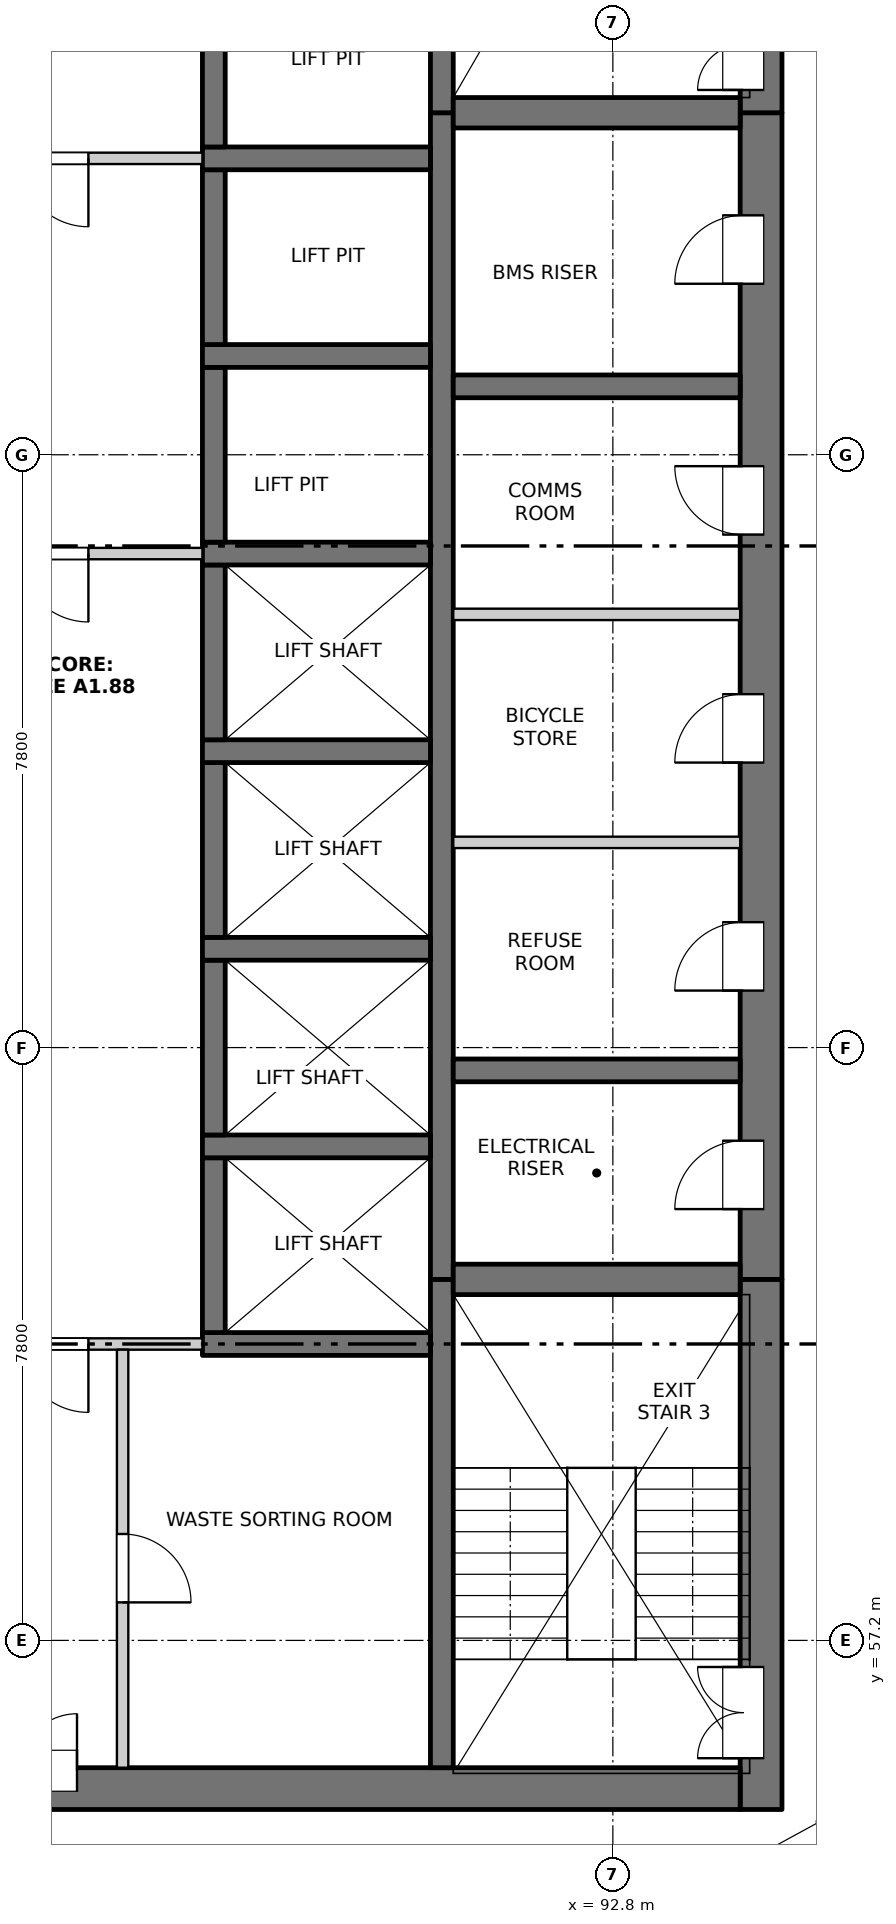
"""IFC4 building model, lengths in metres.
Left out: names, types, materials, properties, quantities, classifications, styles, units other than length and angle.
Written with IfcOpenShell. Run it as: python <this file> out.ifc"""

import sys

from ifc_helpers import new_model, si_unit, direction, frame, frame_2d, origin, place, context, subcontext, project, spatial, rectangle, extrude, element, fill, save


model = new_model("IFC4")
c1 = context("Model", 3, precision=1e-05, world=origin(), true_north=direction((0.0, 1.0)))
c2 = subcontext(c1, "Body", "Model", "MODEL_VIEW")
j1 = project(units=[si_unit("LENGTHUNIT", "METRE"), si_unit("PLANEANGLEUNIT", "RADIAN")], contexts=[c1])
p1 = place(None, origin())
s1 = spatial("IfcSite", under=j1, at=p1, CompositionType="ELEMENT")
p2 = place(p1, origin())
s2 = spatial("IfcBuilding", under=s1, at=p2, CompositionType="ELEMENT")
p3 = place(p2, frame((0.0, 0.0, 130.5)))
s3 = spatial("IfcBuildingStorey", under=s2, at=p3, CompositionType="ELEMENT", Elevation=130.5)
p4 = place(p3, frame((94.75, 54.975, -0.25), z_axis=(0.0, 0.0, 1.0), x_axis=(0.0, 1.0, 0.0)))
e1 = element("IfcWall", 1, at=p4, inside=s3, PredefinedType="SOLIDWALL", context=c2, shape_type="SweptSolid", body=[
    extrude(rectangle(XDim=6.975, YDim=0.55, at=frame_2d((3.487, 0.0))), origin(), (0.0, 0.0, 1.0), 3.4),
])
p5 = place(p4, frame((0.675, 0.0, 0.25)))
e2 = element("IfcOpeningElement", 2, at=p5, cuts=e1, PredefinedType="OPENING", context=c2, shape_type="SweptSolid", body=[
    extrude(rectangle(XDim=1.2, YDim=2.1, at=frame_2d((0.6, 1.05))), frame((0.0, 0.285, 0.0), z_axis=(0.0, -1.0, 0.0), x_axis=(1.0, 0.0, 0.0)), (0.0, 0.0, 1.0), 0.57),
])
p6 = place(p3, frame((94.75, 61.95, -0.25), z_axis=(0.0, 0.0, 1.0), x_axis=(0.0, 1.0, 0.0)))
e3 = element("IfcWall", 3, at=p6, inside=s3, PredefinedType="SOLIDWALL", context=c2, shape_type="SweptSolid", body=[
    extrude(rectangle(XDim=15.35, YDim=0.55, at=frame_2d((7.675, 0.0))), origin(), (0.0, 0.0, 1.0), 3.4),
])
p7 = place(p6, frame((0.925, 0.0, 0.25)))
e4 = element("IfcOpeningElement", 4, at=p7, cuts=e3, PredefinedType="OPENING", context=c2, shape_type="SweptSolid", body=[
    extrude(rectangle(XDim=0.9, YDim=2.1, at=frame_2d((0.45, 1.05))), frame((0.0, 0.285, 0.0), z_axis=(0.0, -1.0, 0.0), x_axis=(1.0, 0.0, 0.0)), (0.0, 0.0, 1.0), 0.57),
])
p8 = place(p6, frame((3.8, 0.0, 0.25)))
e5 = element("IfcOpeningElement", 5, at=p8, cuts=e3, PredefinedType="OPENING", context=c2, shape_type="SweptSolid", body=[
    extrude(rectangle(XDim=0.9, YDim=2.1, at=frame_2d((0.45, 1.05))), frame((0.0, 0.285, 0.0), z_axis=(0.0, -1.0, 0.0), x_axis=(1.0, 0.0, 0.0)), (0.0, 0.0, 1.0), 0.57),
])
p9 = place(p6, frame((6.8, 0.0, 0.25)))
e6 = element("IfcOpeningElement", 6, at=p9, cuts=e3, PredefinedType="OPENING", context=c2, shape_type="SweptSolid", body=[
    extrude(rectangle(XDim=0.9, YDim=2.1, at=frame_2d((0.45, 1.05))), frame((0.0, 0.285, 0.0), z_axis=(0.0, -1.0, 0.0), x_axis=(1.0, 0.0, 0.0)), (0.0, 0.0, 1.0), 0.57),
])
p10 = place(p6, frame((9.8, 0.0, 0.25)))
e7 = element("IfcOpeningElement", 7, at=p10, cuts=e3, PredefinedType="OPENING", context=c2, shape_type="SweptSolid", body=[
    extrude(rectangle(XDim=0.9, YDim=2.1, at=frame_2d((0.45, 1.05))), frame((0.0, 0.285, 0.0), z_axis=(0.0, -1.0, 0.0), x_axis=(1.0, 0.0, 0.0)), (0.0, 0.0, 1.0), 0.57),
])
p11 = place(p6, frame((13.1, 0.0, 0.25)))
e8 = element("IfcOpeningElement", 8, at=p11, cuts=e3, PredefinedType="OPENING", context=c2, shape_type="SweptSolid", body=[
    extrude(rectangle(XDim=0.9, YDim=2.1, at=frame_2d((0.45, 1.05))), frame((0.0, 0.285, 0.0), z_axis=(0.0, -1.0, 0.0), x_axis=(1.0, 0.0, 0.0)), (0.0, 0.0, 1.0), 0.57),
])
p12 = place(p3, frame((94.75, 77.3, -0.25), z_axis=(0.0, 0.0, 1.0), x_axis=(0.0, 1.0, 0.0)))
e9 = element("IfcWall", 9, at=p12, inside=s3, PredefinedType="SOLIDWALL", context=c2, shape_type="SweptSolid", body=[
    extrude(rectangle(XDim=7.475, YDim=0.55, at=frame_2d((3.737, 0.0))), origin(), (0.0, 0.0, 1.0), 3.4),
])
p13 = place(p12, frame((0.3, 0.0, 0.25)))
e10 = element("IfcOpeningElement", 10, at=p13, cuts=e9, PredefinedType="OPENING", context=c2, shape_type="SweptSolid", body=[
    extrude(rectangle(XDim=1.2, YDim=2.1, at=frame_2d((0.6, 1.05))), frame((0.0, 0.285, 0.0), z_axis=(0.0, -1.0, 0.0), x_axis=(1.0, 0.0, 0.0)), (0.0, 0.0, 1.0), 0.57),
])
p14 = place(p3, frame((75.525, 55.25, -0.25), z_axis=(0.0, 0.0, 1.0), x_axis=(1.0, 0.0, 0.0)))
e11 = element("IfcWall", 11, at=p14, inside=s3, PredefinedType="SOLIDWALL", context=c2, shape_type="SweptSolid", body=[
    extrude(rectangle(XDim=18.95, YDim=0.55, at=frame_2d((9.475, 0.0))), origin(), (0.0, 0.0, 1.0), 3.4),
])
p15 = place(p14, frame((8.725, 0.0, 0.25)))
e12 = element("IfcOpeningElement", 12, at=p15, cuts=e11, PredefinedType="OPENING", context=c2, shape_type="SweptSolid", body=[
    extrude(rectangle(XDim=1.5, YDim=2.1, at=frame_2d((0.75, 1.05))), frame((0.0, 0.285, 0.0), z_axis=(0.0, -1.0, 0.0), x_axis=(1.0, 0.0, 0.0)), (0.0, 0.0, 1.0), 0.57),
])
p16 = place(p3, frame((90.55, 55.525, -0.25), z_axis=(0.0, 0.0, 1.0), x_axis=(0.0, 1.0, 0.0)))
e13 = element("IfcWall", 13, at=p16, inside=s3, PredefinedType="SOLIDWALL", context=c2, shape_type="SweptSolid", body=[
    extrude(rectangle(XDim=6.425, YDim=0.3, at=frame_2d((3.212, 0.0))), origin(), (0.0, 0.0, 1.0), 3.4),
])
p17 = place(p3, frame((90.55, 61.95, -0.25), z_axis=(0.0, 0.0, 1.0), x_axis=(0.0, 1.0, 0.0)))
e14 = element("IfcWall", 14, at=p17, inside=s3, PredefinedType="SOLIDWALL", context=c2, shape_type="SweptSolid", body=[
    extrude(rectangle(XDim=15.35, YDim=0.3, at=frame_2d((7.675, 0.0))), origin(), (0.0, 0.0, 1.0), 3.4),
])
p18 = place(p3, frame((90.55, 77.3, -0.25), z_axis=(0.0, 0.0, 1.0), x_axis=(0.0, 1.0, 0.0)))
e15 = element("IfcWall", 15, at=p18, inside=s3, PredefinedType="SOLIDWALL", context=c2, shape_type="SweptSolid", body=[
    extrude(rectangle(XDim=6.925, YDim=0.3, at=frame_2d((3.462, 0.0))), origin(), (0.0, 0.0, 1.0), 3.4),
])
p19 = place(p3, frame((87.4, 61.1, -0.25), z_axis=(0.0, 0.0, 1.0), x_axis=(1.0, 0.0, 0.0)))
e16 = element("IfcWall", 16, at=p19, inside=s3, PredefinedType="SOLIDWALL", context=c2, shape_type="SweptSolid", body=[
    extrude(rectangle(XDim=3.0, YDim=0.3, at=frame_2d((1.5, 0.0))), origin(), (0.0, 0.0, 1.0), 3.4),
])
p20 = place(p3, frame((87.55, 61.25, -0.25), z_axis=(0.0, 0.0, 1.0), x_axis=(0.0, 1.0, 0.0)))
e17 = element("IfcWall", 17, at=p20, inside=s3, PredefinedType="SOLIDWALL", context=c2, shape_type="SweptSolid", body=[
    extrude(rectangle(XDim=2.3, YDim=0.3, at=frame_2d((1.15, 0.0))), origin(), (0.0, 0.0, 1.0), 3.4),
])
p21 = place(p3, frame((87.4, 63.7, -0.25), z_axis=(0.0, 0.0, 1.0), x_axis=(1.0, 0.0, 0.0)))
e18 = element("IfcWall", 18, at=p21, inside=s3, PredefinedType="SOLIDWALL", context=c2, shape_type="SweptSolid", body=[
    extrude(rectangle(XDim=3.0, YDim=0.3, at=frame_2d((1.5, 0.0))), origin(), (0.0, 0.0, 1.0), 3.4),
])
p22 = place(p3, frame((87.55, 63.85, -0.25), z_axis=(0.0, 0.0, 1.0), x_axis=(0.0, 1.0, 0.0)))
e19 = element("IfcWall", 19, at=p22, inside=s3, PredefinedType="SOLIDWALL", context=c2, shape_type="SweptSolid", body=[
    extrude(rectangle(XDim=2.3, YDim=0.3, at=frame_2d((1.15, 0.0))), origin(), (0.0, 0.0, 1.0), 3.4),
])
p23 = place(p3, frame((87.4, 66.3, -0.25), z_axis=(0.0, 0.0, 1.0), x_axis=(1.0, 0.0, 0.0)))
e20 = element("IfcWall", 20, at=p23, inside=s3, PredefinedType="SOLIDWALL", context=c2, shape_type="SweptSolid", body=[
    extrude(rectangle(XDim=3.0, YDim=0.3, at=frame_2d((1.5, 0.0))), origin(), (0.0, 0.0, 1.0), 3.4),
])
p24 = place(p3, frame((87.55, 66.45, -0.25), z_axis=(0.0, 0.0, 1.0), x_axis=(0.0, 1.0, 0.0)))
e21 = element("IfcWall", 21, at=p24, inside=s3, PredefinedType="SOLIDWALL", context=c2, shape_type="SweptSolid", body=[
    extrude(rectangle(XDim=2.3, YDim=0.3, at=frame_2d((1.15, 0.0))), origin(), (0.0, 0.0, 1.0), 3.4),
])
p25 = place(p3, frame((87.4, 68.9, -0.25), z_axis=(0.0, 0.0, 1.0), x_axis=(1.0, 0.0, 0.0)))
e22 = element("IfcWall", 22, at=p25, inside=s3, PredefinedType="SOLIDWALL", context=c2, shape_type="SweptSolid", body=[
    extrude(rectangle(XDim=3.0, YDim=0.3, at=frame_2d((1.5, 0.0))), origin(), (0.0, 0.0, 1.0), 3.4),
])
p26 = place(p3, frame((87.55, 69.05, -0.25), z_axis=(0.0, 0.0, 1.0), x_axis=(0.0, 1.0, 0.0)))
e23 = element("IfcWall", 23, at=p26, inside=s3, PredefinedType="SOLIDWALL", context=c2, shape_type="SweptSolid", body=[
    extrude(rectangle(XDim=2.3, YDim=0.3, at=frame_2d((1.15, 0.0))), origin(), (0.0, 0.0, 1.0), 3.4),
])
p27 = place(p3, frame((87.4, 71.5, -0.25), z_axis=(0.0, 0.0, 1.0), x_axis=(1.0, 0.0, 0.0)))
e24 = element("IfcWall", 24, at=p27, inside=s3, PredefinedType="SOLIDWALL", context=c2, shape_type="SweptSolid", body=[
    extrude(rectangle(XDim=3.0, YDim=0.3, at=frame_2d((1.5, 0.0))), origin(), (0.0, 0.0, 1.0), 3.4),
])
p28 = place(p3, frame((87.55, 71.65, -0.25), z_axis=(0.0, 0.0, 1.0), x_axis=(0.0, 1.0, 0.0)))
e25 = element("IfcWall", 25, at=p28, inside=s3, PredefinedType="SOLIDWALL", context=c2, shape_type="SweptSolid", body=[
    extrude(rectangle(XDim=2.3, YDim=0.3, at=frame_2d((1.15, 0.0))), origin(), (0.0, 0.0, 1.0), 3.4),
])
p29 = place(p3, frame((87.4, 74.1, -0.25), z_axis=(0.0, 0.0, 1.0), x_axis=(1.0, 0.0, 0.0)))
e26 = element("IfcWall", 26, at=p29, inside=s3, PredefinedType="SOLIDWALL", context=c2, shape_type="SweptSolid", body=[
    extrude(rectangle(XDim=3.0, YDim=0.3, at=frame_2d((1.5, 0.0))), origin(), (0.0, 0.0, 1.0), 3.4),
])
p30 = place(p3, frame((87.55, 74.25, -0.25), z_axis=(0.0, 0.0, 1.0), x_axis=(0.0, 1.0, 0.0)))
e27 = element("IfcWall", 27, at=p30, inside=s3, PredefinedType="SOLIDWALL", context=c2, shape_type="SweptSolid", body=[
    extrude(rectangle(XDim=2.3, YDim=0.3, at=frame_2d((1.15, 0.0))), origin(), (0.0, 0.0, 1.0), 3.4),
])
p31 = place(p3, frame((87.4, 76.7, -0.25), z_axis=(0.0, 0.0, 1.0), x_axis=(1.0, 0.0, 0.0)))
e28 = element("IfcWall", 28, at=p31, inside=s3, PredefinedType="SOLIDWALL", context=c2, shape_type="SweptSolid", body=[
    extrude(rectangle(XDim=3.0, YDim=0.3, at=frame_2d((1.5, 0.0))), origin(), (0.0, 0.0, 1.0), 3.4),
])
p32 = place(p3, frame((87.55, 76.85, -0.25), z_axis=(0.0, 0.0, 1.0), x_axis=(0.0, 1.0, 0.0)))
e29 = element("IfcWall", 29, at=p32, inside=s3, PredefinedType="SOLIDWALL", context=c2, shape_type="SweptSolid", body=[
    extrude(rectangle(XDim=2.3, YDim=0.3, at=frame_2d((1.15, 0.0))), origin(), (0.0, 0.0, 1.0), 3.4),
])
p33 = place(p3, frame((90.7, 61.95, -0.25), z_axis=(0.0, 0.0, 1.0), x_axis=(1.0, 0.0, 0.0)))
e30 = element("IfcWall", 30, at=p33, inside=s3, PredefinedType="SOLIDWALL", context=c2, shape_type="SweptSolid", body=[
    extrude(rectangle(XDim=3.775, YDim=0.4, at=frame_2d((1.888, 0.0))), origin(), (0.0, 0.0, 1.0), 3.4),
])
for number, where, z_axis, x_axis in (
    (31, (90.7, 64.7, -0.25), (0.0, 0.0, 1.0), (1.0, 0.0, 0.0)),
    (32, (90.7, 73.7, -0.25), (0.0, 0.0, 1.0), (1.0, 0.0, 0.0)),
):
    element("IfcWall", number, at=place(p3, frame(where, z_axis=z_axis, x_axis=x_axis)), inside=s3, PredefinedType="SOLIDWALL", context=c2, shape_type="SweptSolid", body=[
        extrude(rectangle(XDim=3.775, YDim=0.3, at=frame_2d((1.888, 0.0))), origin(), (0.0, 0.0, 1.0), 3.4),
    ])
p34 = place(p3, frame((90.7, 77.3, -0.25), z_axis=(0.0, 0.0, 1.0), x_axis=(1.0, 0.0, 0.0)))
e33 = element("IfcWall", 33, at=p34, inside=s3, PredefinedType="SOLIDWALL", context=c2, shape_type="SweptSolid", body=[
    extrude(rectangle(XDim=3.775, YDim=0.4, at=frame_2d((1.888, 0.0))), origin(), (0.0, 0.0, 1.0), 3.4),
])
p35 = place(p3, frame((82.6, 61.1, 0.0), z_axis=(0.0, 0.0, 1.0), x_axis=(1.0, 0.0, 0.0)))
e34 = element("IfcWall", 34, at=p35, inside=s3, PredefinedType="PARTITIONING", context=c2, shape_type="SweptSolid", body=[
    extrude(rectangle(XDim=4.8, YDim=0.15, at=frame_2d((2.4, 0.0))), origin(), (0.0, 0.0, 1.0), 3.15),
])
p36 = place(p35, frame((1.5, 0.0, 0.0)))
e35 = element("IfcOpeningElement", 35, at=p36, cuts=e34, PredefinedType="OPENING", context=c2, shape_type="SweptSolid", body=[
    extrude(rectangle(XDim=1.8, YDim=2.1, at=frame_2d((0.9, 1.05))), frame((0.0, 0.085, 0.0), z_axis=(0.0, -1.0, 0.0), x_axis=(1.0, 0.0, 0.0)), (0.0, 0.0, 1.0), 0.17),
])
for number, where, z_axis, x_axis in (
    (36, (90.7, 67.7, 0.0), (0.0, 0.0, 1.0), (1.0, 0.0, 0.0)),
    (37, (90.7, 70.7, 0.0), (0.0, 0.0, 1.0), (1.0, 0.0, 0.0)),
):
    element("IfcWall", number, at=place(p3, frame(where, z_axis=z_axis, x_axis=x_axis)), inside=s3, PredefinedType="PARTITIONING", context=c2, shape_type="SweptSolid", body=[
        extrude(rectangle(XDim=3.775, YDim=0.15, at=frame_2d((1.887, 0.0))), origin(), (0.0, 0.0, 1.0), 3.15),
    ])
p37 = place(p3, frame((82.6, 71.5, 0.0), z_axis=(0.0, 0.0, 1.0), x_axis=(1.0, 0.0, 0.0)))
e38 = element("IfcWall", 38, at=p37, inside=s3, PredefinedType="PARTITIONING", context=c2, shape_type="SweptSolid", body=[
    extrude(rectangle(XDim=4.8, YDim=0.15, at=frame_2d((2.4, 0.0))), origin(), (0.0, 0.0, 1.0), 3.15),
])
p38 = place(p37, frame((1.5, 0.0, 0.0)))
e39 = element("IfcOpeningElement", 39, at=p38, cuts=e38, PredefinedType="OPENING", context=c2, shape_type="SweptSolid", body=[
    extrude(rectangle(XDim=1.8, YDim=2.1, at=frame_2d((0.9, 1.05))), frame((0.0, 0.085, 0.0), z_axis=(0.0, -1.0, 0.0), x_axis=(1.0, 0.0, 0.0)), (0.0, 0.0, 1.0), 0.17),
])
p39 = place(p3, frame((82.6, 76.7, 0.0), z_axis=(0.0, 0.0, 1.0), x_axis=(1.0, 0.0, 0.0)))
e40 = element("IfcWall", 40, at=p39, inside=s3, PredefinedType="PARTITIONING", context=c2, shape_type="SweptSolid", body=[
    extrude(rectangle(XDim=4.8, YDim=0.15, at=frame_2d((2.4, 0.0))), origin(), (0.0, 0.0, 1.0), 3.15),
])
p40 = place(p39, frame((1.5, 0.0, 0.0)))
e41 = element("IfcOpeningElement", 41, at=p40, cuts=e40, PredefinedType="OPENING", context=c2, shape_type="SweptSolid", body=[
    extrude(rectangle(XDim=1.8, YDim=2.1, at=frame_2d((0.9, 1.05))), frame((0.0, 0.085, 0.0), z_axis=(0.0, -1.0, 0.0), x_axis=(1.0, 0.0, 0.0)), (0.0, 0.0, 1.0), 0.17),
])
p41 = place(p3, frame((86.35, 55.525, 0.0), z_axis=(0.0, 0.0, 1.0), x_axis=(0.0, 1.0, 0.0)))
e42 = element("IfcWall", 42, at=p41, inside=s3, PredefinedType="PARTITIONING", context=c2, shape_type="SweptSolid", body=[
    extrude(rectangle(XDim=5.5, YDim=0.15, at=frame_2d((2.75, 0.0))), origin(), (0.0, 0.0, 1.0), 3.15),
])
p42 = place(p41, frame((2.175, 0.0, 0.0)))
e43 = element("IfcOpeningElement", 43, at=p42, cuts=e42, PredefinedType="OPENING", context=c2, shape_type="SweptSolid", body=[
    extrude(rectangle(XDim=0.9, YDim=2.1, at=frame_2d((0.45, 1.05))), frame((0.0, 0.085, 0.0), z_axis=(0.0, -1.0, 0.0), x_axis=(1.0, 0.0, 0.0)), (0.0, 0.0, 1.0), 0.17),
])
p43 = place(p15, origin())
e44 = element("IfcDoor", 44, at=p43, inside=s3, OperationType="DOUBLE_DOOR_SINGLE_SWING", PredefinedType="DOOR", context=c2, shape_type="SweptSolid", body=[
    extrude(rectangle(XDim=1.5, YDim=2.1, at=frame_2d((0.75, 1.05))), frame((0.0, 0.26, 0.0), z_axis=(0.0, -1.0, 0.0), x_axis=(1.0, 0.0, 0.0)), (0.0, 0.0, 1.0), 0.05),
])
fill(e12, e44)
p44 = place(p5, origin())
e45 = element("IfcDoor", 45, at=p44, inside=s3, OperationType="DOUBLE_DOOR_SINGLE_SWING", PredefinedType="DOOR", context=c2, shape_type="SweptSolid", body=[
    extrude(rectangle(XDim=1.2, YDim=2.1, at=frame_2d((0.6, 1.05))), frame((0.0, 0.26, 0.0), z_axis=(0.0, -1.0, 0.0), x_axis=(1.0, 0.0, 0.0)), (0.0, 0.0, 1.0), 0.05),
])
fill(e2, e45)
p45 = place(p42, origin())
e46 = element("IfcDoor", 46, at=p45, inside=s3, OperationType="SINGLE_SWING_RIGHT", PredefinedType="DOOR", context=c2, shape_type="SweptSolid", body=[
    extrude(rectangle(XDim=0.9, YDim=2.1, at=frame_2d((0.45, 1.05))), frame((0.0, 0.025, 0.0), z_axis=(0.0, -1.0, 0.0), x_axis=(1.0, 0.0, 0.0)), (0.0, 0.0, 1.0), 0.05),
])
fill(e43, e46)
p46 = place(p36, origin())
e47 = element("IfcDoor", 47, at=p46, inside=s3, OperationType="DOUBLE_DOOR_SINGLE_SWING", PredefinedType="DOOR", context=c2, shape_type="SweptSolid", body=[
    extrude(rectangle(XDim=1.8, YDim=2.1, at=frame_2d((0.9, 1.05))), frame((0.0, 0.025, 0.0), z_axis=(0.0, -1.0, 0.0), x_axis=(1.0, 0.0, 0.0)), (0.0, 0.0, 1.0), 0.05),
])
fill(e35, e47)
p47 = place(p7, origin())
e48 = element("IfcDoor", 48, at=p47, inside=s3, OperationType="SINGLE_SWING_LEFT", PredefinedType="DOOR", context=c2, shape_type="SweptSolid", body=[
    extrude(rectangle(XDim=0.9, YDim=2.1, at=frame_2d((0.45, 1.05))), frame((0.0, 0.26, 0.0), z_axis=(0.0, -1.0, 0.0), x_axis=(1.0, 0.0, 0.0)), (0.0, 0.0, 1.0), 0.05),
])
fill(e4, e48)
p48 = place(p8, origin())
e49 = element("IfcDoor", 49, at=p48, inside=s3, OperationType="SINGLE_SWING_LEFT", PredefinedType="DOOR", context=c2, shape_type="SweptSolid", body=[
    extrude(rectangle(XDim=0.9, YDim=2.1, at=frame_2d((0.45, 1.05))), frame((0.0, 0.26, 0.0), z_axis=(0.0, -1.0, 0.0), x_axis=(1.0, 0.0, 0.0)), (0.0, 0.0, 1.0), 0.05),
])
fill(e5, e49)
p49 = place(p9, origin())
e50 = element("IfcDoor", 50, at=p49, inside=s3, OperationType="SINGLE_SWING_LEFT", PredefinedType="DOOR", context=c2, shape_type="SweptSolid", body=[
    extrude(rectangle(XDim=0.9, YDim=2.1, at=frame_2d((0.45, 1.05))), frame((0.0, 0.26, 0.0), z_axis=(0.0, -1.0, 0.0), x_axis=(1.0, 0.0, 0.0)), (0.0, 0.0, 1.0), 0.05),
])
fill(e6, e50)
p50 = place(p38, origin())
e51 = element("IfcDoor", 51, at=p50, inside=s3, OperationType="DOUBLE_DOOR_SINGLE_SWING", PredefinedType="DOOR", context=c2, shape_type="SweptSolid", body=[
    extrude(rectangle(XDim=1.8, YDim=2.1, at=frame_2d((0.9, 1.05))), frame((0.0, 0.025, 0.0), z_axis=(0.0, -1.0, 0.0), x_axis=(1.0, 0.0, 0.0)), (0.0, 0.0, 1.0), 0.05),
])
fill(e39, e51)
p51 = place(p10, origin())
e52 = element("IfcDoor", 52, at=p51, inside=s3, OperationType="SINGLE_SWING_RIGHT", PredefinedType="DOOR", context=c2, shape_type="SweptSolid", body=[
    extrude(rectangle(XDim=0.9, YDim=2.1, at=frame_2d((0.45, 1.05))), frame((0.0, 0.26, 0.0), z_axis=(0.0, -1.0, 0.0), x_axis=(1.0, 0.0, 0.0)), (0.0, 0.0, 1.0), 0.05),
])
fill(e7, e52)
p52 = place(p11, origin())
e53 = element("IfcDoor", 53, at=p52, inside=s3, OperationType="SINGLE_SWING_LEFT", PredefinedType="DOOR", context=c2, shape_type="SweptSolid", body=[
    extrude(rectangle(XDim=0.9, YDim=2.1, at=frame_2d((0.45, 1.05))), frame((0.0, 0.26, 0.0), z_axis=(0.0, -1.0, 0.0), x_axis=(1.0, 0.0, 0.0)), (0.0, 0.0, 1.0), 0.05),
])
fill(e8, e53)
p53 = place(p40, origin())
e54 = element("IfcDoor", 54, at=p53, inside=s3, OperationType="DOUBLE_DOOR_SINGLE_SWING", PredefinedType="DOOR", context=c2, shape_type="SweptSolid", body=[
    extrude(rectangle(XDim=1.8, YDim=2.1, at=frame_2d((0.9, 1.05))), frame((0.0, 0.025, 0.0), z_axis=(0.0, -1.0, 0.0), x_axis=(1.0, 0.0, 0.0)), (0.0, 0.0, 1.0), 0.05),
])
fill(e41, e54)
p54 = place(p13, origin())
e55 = element("IfcDoor", 55, at=p54, inside=s3, OperationType="DOUBLE_DOOR_SINGLE_SWING", PredefinedType="DOOR", context=c2, shape_type="SweptSolid", body=[
    extrude(rectangle(XDim=1.2, YDim=2.1, at=frame_2d((0.6, 1.05))), frame((0.0, 0.26, 0.0), z_axis=(0.0, -1.0, 0.0), x_axis=(1.0, 0.0, 0.0)), (0.0, 0.0, 1.0), 0.05),
])
fill(e10, e55)
save(model, sys.argv[1])
